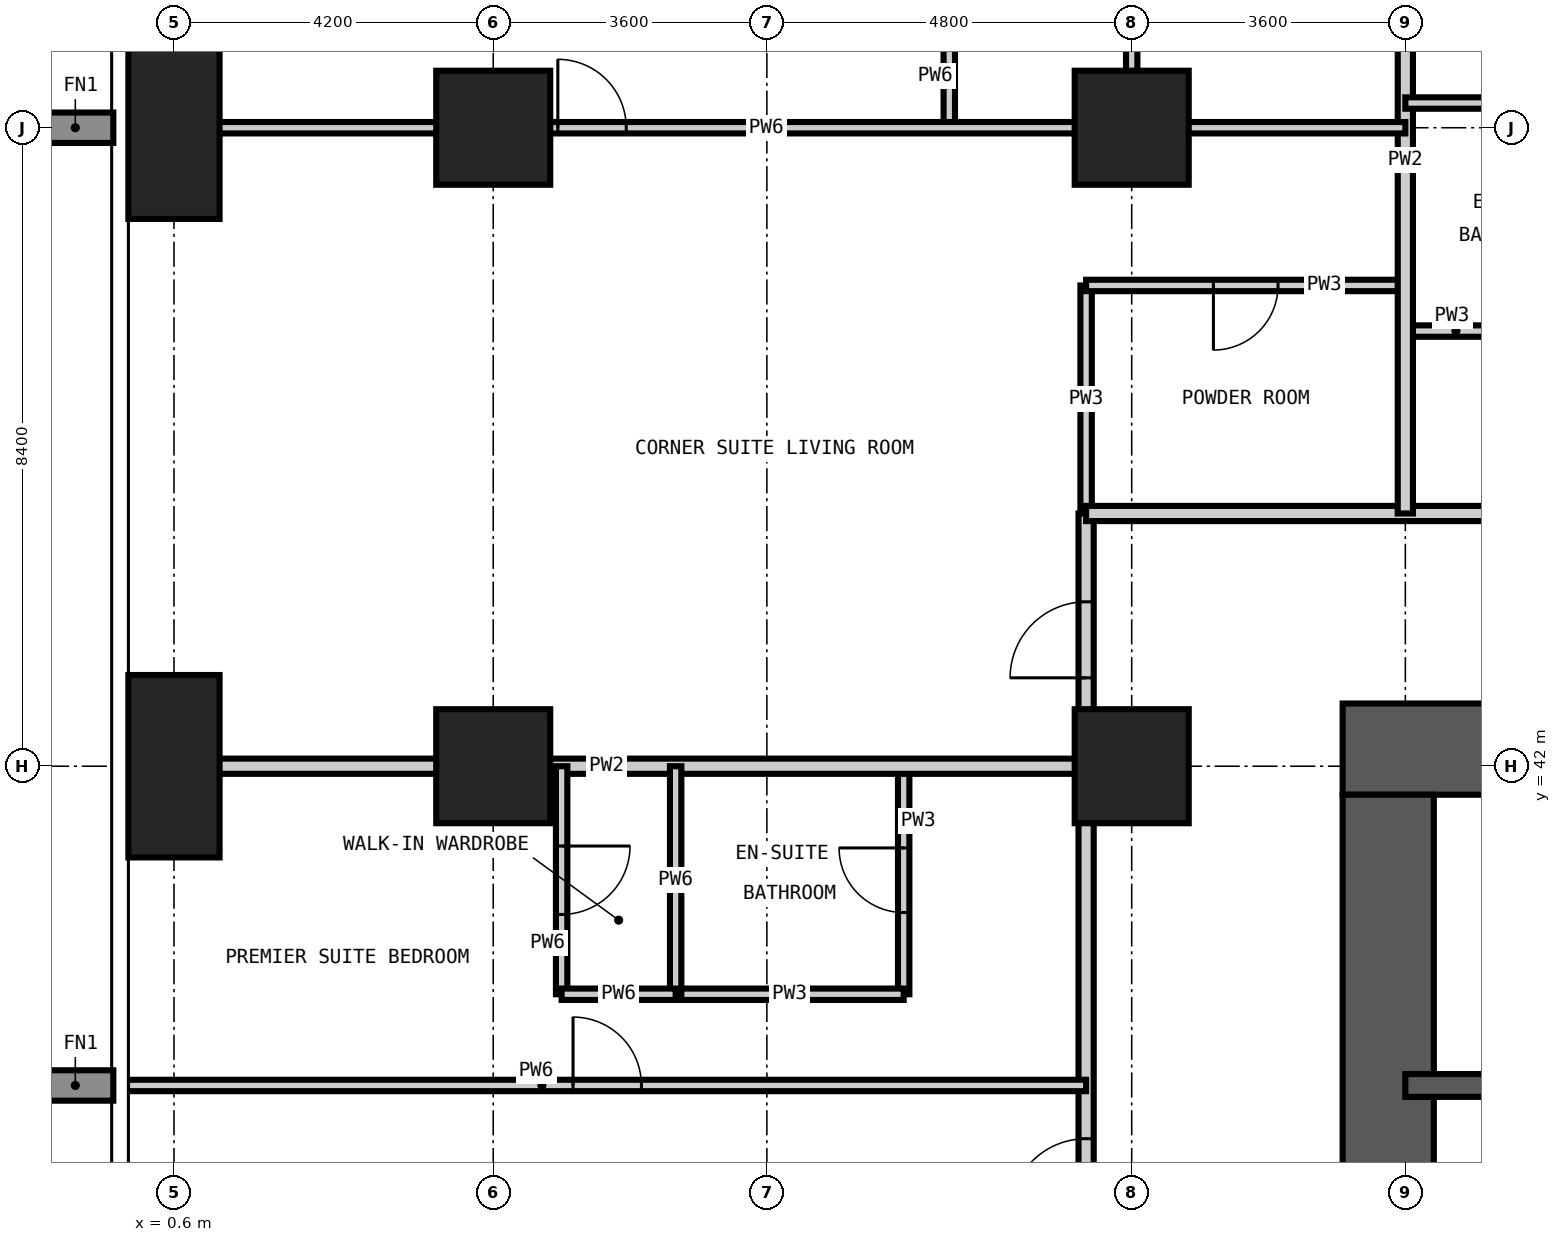
"""IFC4 building model, lengths in metres.
Left out: names, types, materials, properties, quantities, classifications, styles, units other than length and angle.
Written with IfcOpenShell. Run it as: python <this file> out.ifc"""

import sys

from ifc_helpers import new_model, si_unit, direction, frame, frame_2d, origin, origin_2d, place, context, subcontext, project, spatial, rectangle, extrude, element, fill, save


model = new_model("IFC4")
c1 = context("Model", 3, precision=1e-05, world=origin(), true_north=direction((0.0, 1.0)))
c2 = subcontext(c1, "Body", "Model", "MODEL_VIEW")
j1 = project(units=[si_unit("LENGTHUNIT", "METRE"), si_unit("PLANEANGLEUNIT", "RADIAN")], contexts=[c1])
p1 = place(None, origin())
s1 = spatial("IfcSite", under=j1, at=p1, CompositionType="ELEMENT")
p2 = place(p1, origin())
s2 = spatial("IfcBuilding", under=s1, at=p2, CompositionType="ELEMENT")
p3 = place(p2, frame((0.0, 0.0, 100.8)))
s3 = spatial("IfcBuildingStorey", under=s2, at=p3, CompositionType="ELEMENT", Elevation=100.8)
for number, where, z_axis, x_axis in (
    (1, (0.6, 42.0, -0.35), (0.0, 0.0, 1.0), (1.0, 0.0, 0.0)),
    (2, (0.6, 50.4, -0.35), (0.0, 0.0, 1.0), (1.0, 0.0, 0.0)),
):
    element("IfcColumn", number, at=place(p3, frame(where, z_axis=z_axis, x_axis=x_axis)), inside=s3, PredefinedType="COLUMN", context=c2, shape_type="SweptSolid", body=[
        extrude(rectangle(XDim=1.2, YDim=2.4, at=origin_2d()), origin(), (0.0, 0.0, 1.0), 3.6),
    ])
for number, where, z_axis, x_axis in (
    (3, (4.8, 42.0, -0.35), (0.0, 0.0, 1.0), (1.0, 0.0, 0.0)),
    (4, (4.8, 50.4, -0.35), (0.0, 0.0, 1.0), (1.0, 0.0, 0.0)),
    (5, (13.2, 42.0, -0.35), (0.0, 0.0, 1.0), (1.0, 0.0, 0.0)),
    (6, (13.2, 50.4, -0.35), (0.0, 0.0, 1.0), (1.0, 0.0, 0.0)),
):
    element("IfcColumn", number, at=place(p3, frame(where, z_axis=z_axis, x_axis=x_axis)), inside=s3, PredefinedType="COLUMN", context=c2, shape_type="SweptSolid", body=[
        extrude(rectangle(XDim=1.5, YDim=1.5, at=origin_2d()), origin(), (0.0, 0.0, 1.0), 3.6),
    ])
p4 = place(p3, frame((42.825, 42.225, -0.35), z_axis=(0.0, 0.0, 1.0), x_axis=(-1.0, 0.0, 0.0)))
e7 = element("IfcWall", 7, at=p4, inside=s3, PredefinedType="SHEAR", context=c2, shape_type="SweptSolid", body=[
    extrude(rectangle(XDim=26.85, YDim=1.2, at=frame_2d((13.425, 0.0))), origin(), (0.0, 0.0, 1.0), 3.6),
])
p5 = place(p4, frame((21.325, 0.0, 0.35)))
e8 = element("IfcOpeningElement", 8, at=p5, cuts=e7, PredefinedType="OPENING", context=c2, shape_type="SweptSolid", body=[
    extrude(rectangle(XDim=1.0, YDim=2.1, at=frame_2d((0.5, 1.05))), frame((0.0, 0.61, 0.0), z_axis=(0.0, -1.0, 0.0), x_axis=(1.0, 0.0, 0.0)), (0.0, 0.0, 1.0), 1.22),
])
p6 = place(p4, frame((10.725, 0.0, 0.35)))
e9 = element("IfcOpeningElement", 9, at=p6, cuts=e7, PredefinedType="OPENING", context=c2, shape_type="SweptSolid", body=[
    extrude(rectangle(XDim=1.2, YDim=2.2, at=frame_2d((0.6, 1.1))), frame((0.0, 0.61, 0.0), z_axis=(0.0, -1.0, 0.0), x_axis=(1.0, 0.0, 0.0)), (0.0, 0.0, 1.0), 1.22),
])
p7 = place(p3, frame((16.575, 41.625, -0.35), z_axis=(0.0, 0.0, 1.0), x_axis=(0.0, -1.0, 0.0)))
e10 = element("IfcWall", 10, at=p7, inside=s3, PredefinedType="SHEAR", context=c2, shape_type="SweptSolid", body=[
    extrude(rectangle(XDim=24.45, YDim=1.2, at=frame_2d((12.225, 0.0))), origin(), (0.0, 0.0, 1.0), 3.6),
])
p8 = place(p7, frame((11.325, 0.0, 0.35)))
e11 = element("IfcOpeningElement", 11, at=p8, cuts=e10, PredefinedType="OPENING", context=c2, shape_type="SweptSolid", body=[
    extrude(rectangle(XDim=1.8, YDim=2.2, at=frame_2d((0.9, 1.1))), frame((0.0, 0.61, 0.0), z_axis=(0.0, -1.0, 0.0), x_axis=(1.0, 0.0, 0.0)), (0.0, 0.0, 1.0), 1.22),
])
p9 = place(p7, frame((20.125, 0.0, 0.35)))
e12 = element("IfcOpeningElement", 12, at=p9, cuts=e10, PredefinedType="OPENING", context=c2, shape_type="SweptSolid", body=[
    extrude(rectangle(XDim=1.0, YDim=2.1, at=frame_2d((0.5, 1.05))), frame((0.0, 0.61, 0.0), z_axis=(0.0, -1.0, 0.0), x_axis=(1.0, 0.0, 0.0)), (0.0, 0.0, 1.0), 1.22),
])
p10 = place(p7, frame((5.425, 0.0, 0.35)))
e13 = element("IfcOpeningElement", 13, at=p10, cuts=e10, PredefinedType="OPENING", context=c2, shape_type="SweptSolid", body=[
    extrude(rectangle(XDim=1.0, YDim=2.1, at=frame_2d((0.5, 1.05))), frame((0.0, 0.61, 0.0), z_axis=(0.0, -1.0, 0.0), x_axis=(1.0, 0.0, 0.0)), (0.0, 0.0, 1.0), 1.22),
])
p11 = place(p3, frame((16.8, 37.8, -0.35), z_axis=(0.0, 0.0, 1.0), x_axis=(1.0, 0.0, 0.0)))
e14 = element("IfcWall", 14, at=p11, inside=s3, PredefinedType="SHEAR", context=c2, shape_type="SweptSolid", body=[
    extrude(rectangle(XDim=8.4, YDim=0.3, at=frame_2d((4.2, 0.0))), origin(), (0.0, 0.0, 1.0), 3.6),
])
p12 = place(p3, frame((10.2, 39.0, 0.0), z_axis=(0.0, 0.0, 1.0), x_axis=(0.0, 1.0, 0.0)))
e15 = element("IfcWall", 15, at=p12, inside=s3, PredefinedType="PARTITIONING", context=c2, shape_type="SweptSolid", body=[
    extrude(rectangle(XDim=3.0, YDim=0.15, at=frame_2d((1.5, 0.0))), origin(), (0.0, 0.0, 1.0), 3.25),
])
p13 = place(p12, frame((1.075, 0.0, 0.0)))
e16 = element("IfcOpeningElement", 16, at=p13, cuts=e15, PredefinedType="OPENING", context=c2, shape_type="SweptSolid", body=[
    extrude(rectangle(XDim=0.85, YDim=2.1, at=frame_2d((0.425, 1.05))), frame((0.0, 0.085, 0.0), z_axis=(0.0, -1.0, 0.0), x_axis=(1.0, 0.0, 0.0)), (0.0, 0.0, 1.0), 0.17),
])
for number, where, z_axis, x_axis in (
    (17, (12.6, 45.325, 0.0), (0.0, 0.0, 1.0), (0.0, 1.0, 0.0)),
    (18, (7.2, 39.0, 0.0), (0.0, 0.0, 1.0), (1.0, 0.0, 0.0)),
):
    element("IfcWall", number, at=place(p3, frame(where, z_axis=z_axis, x_axis=x_axis)), inside=s3, PredefinedType="PARTITIONING", context=c2, shape_type="SweptSolid", body=[
        extrude(rectangle(XDim=3.0, YDim=0.15, at=frame_2d((1.5, 0.0))), origin(), (0.0, 0.0, 1.0), 3.25),
    ])
p14 = place(p3, frame((16.8, 47.725, 0.0), z_axis=(0.0, 0.0, 1.0), x_axis=(1.0, 0.0, 0.0)))
e19 = element("IfcWall", 19, at=p14, inside=s3, PredefinedType="PARTITIONING", context=c2, shape_type="SweptSolid", body=[
    extrude(rectangle(XDim=3.0, YDim=0.15, at=frame_2d((1.5, 0.0))), origin(), (0.0, 0.0, 1.0), 3.25),
])
p15 = place(p14, frame((1.075, 0.0, 0.0)))
e20 = element("IfcOpeningElement", 20, at=p15, cuts=e19, PredefinedType="OPENING", context=c2, shape_type="SweptSolid", body=[
    extrude(rectangle(XDim=0.85, YDim=2.1, at=frame_2d((0.425, 1.05))), frame((0.0, 0.085, 0.0), z_axis=(0.0, -1.0, 0.0), x_axis=(1.0, 0.0, 0.0)), (0.0, 0.0, 1.0), 0.17),
])
p16 = place(p3, frame((12.6, 48.325, 0.0), z_axis=(0.0, 0.0, 1.0), x_axis=(1.0, 0.0, 0.0)))
e21 = element("IfcWall", 21, at=p16, inside=s3, PredefinedType="PARTITIONING", context=c2, shape_type="SweptSolid", body=[
    extrude(rectangle(XDim=4.2, YDim=0.15, at=frame_2d((2.1, 0.0))), origin(), (0.0, 0.0, 1.0), 3.25),
])
p17 = place(p16, frame((1.675, 0.0, 0.0)))
e22 = element("IfcOpeningElement", 22, at=p17, cuts=e21, PredefinedType="OPENING", context=c2, shape_type="SweptSolid", body=[
    extrude(rectangle(XDim=0.85, YDim=2.1, at=frame_2d((0.425, 1.05))), frame((0.0, 0.085, 0.0), z_axis=(0.0, -1.0, 0.0), x_axis=(1.0, 0.0, 0.0)), (0.0, 0.0, 1.0), 0.17),
])
p18 = place(p3, frame((12.6, 14.075, 0.0), z_axis=(0.0, 0.0, 1.0), x_axis=(0.0, 1.0, 0.0)))
e23 = element("IfcWall", 23, at=p18, inside=s3, PredefinedType="PARTITIONING", context=c2, shape_type="SweptSolid", body=[
    extrude(rectangle(XDim=31.25, YDim=0.2, at=frame_2d((15.625, 0.0))), origin(), (0.0, 0.0, 1.0), 3.25),
])
p19 = place(p18, frame((5.225, 0.0, 0.0)))
e24 = element("IfcOpeningElement", 24, at=p19, cuts=e23, PredefinedType="OPENING", context=c2, shape_type="SweptSolid", body=[
    extrude(rectangle(XDim=1.0, YDim=2.2, at=frame_2d((0.5, 1.1))), frame((0.0, 0.11, 0.0), z_axis=(0.0, -1.0, 0.0), x_axis=(1.0, 0.0, 0.0)), (0.0, 0.0, 1.0), 0.22),
])
p20 = place(p18, frame((13.625, 0.0, 0.0)))
e25 = element("IfcOpeningElement", 25, at=p20, cuts=e23, PredefinedType="OPENING", context=c2, shape_type="SweptSolid", body=[
    extrude(rectangle(XDim=1.0, YDim=2.2, at=frame_2d((0.5, 1.1))), frame((0.0, 0.11, 0.0), z_axis=(0.0, -1.0, 0.0), x_axis=(1.0, 0.0, 0.0)), (0.0, 0.0, 1.0), 0.22),
])
p21 = place(p18, frame((22.025, 0.0, 0.0)))
e26 = element("IfcOpeningElement", 26, at=p21, cuts=e23, PredefinedType="OPENING", context=c2, shape_type="SweptSolid", body=[
    extrude(rectangle(XDim=1.0, YDim=2.2, at=frame_2d((0.5, 1.1))), frame((0.0, 0.11, 0.0), z_axis=(0.0, -1.0, 0.0), x_axis=(1.0, 0.0, 0.0)), (0.0, 0.0, 1.0), 0.22),
])
p22 = place(p18, frame((0.863, 0.0, 0.0)))
e27 = element("IfcOpeningElement", 27, at=p22, cuts=e23, PredefinedType="OPENING", context=c2, shape_type="SweptSolid", body=[
    extrude(rectangle(XDim=1.0, YDim=2.2, at=frame_2d((0.5, 1.1))), frame((0.0, 0.11, 0.0), z_axis=(0.0, -1.0, 0.0), x_axis=(1.0, 0.0, 0.0)), (0.0, 0.0, 1.0), 0.22),
])
p23 = place(p18, frame((29.088, 0.0, 0.0)))
e28 = element("IfcOpeningElement", 28, at=p23, cuts=e23, PredefinedType="OPENING", context=c2, shape_type="SweptSolid", body=[
    extrude(rectangle(XDim=1.0, YDim=2.2, at=frame_2d((0.5, 1.1))), frame((0.0, 0.11, 0.0), z_axis=(0.0, -1.0, 0.0), x_axis=(1.0, 0.0, 0.0)), (0.0, 0.0, 1.0), 0.22),
])
p24 = place(p3, frame((12.6, 45.325, 0.0), z_axis=(0.0, 0.0, 1.0), x_axis=(1.0, 0.0, 0.0)))
e29 = element("IfcWall", 29, at=p24, inside=s3, PredefinedType="PARTITIONING", context=c2, shape_type="SweptSolid", body=[
    extrude(rectangle(XDim=33.325, YDim=0.2, at=frame_2d((16.663, 0.0))), origin(), (0.0, 0.0, 1.0), 3.25),
])
p25 = place(p24, frame((7.9, 0.0, 0.0)))
e30 = element("IfcOpeningElement", 30, at=p25, cuts=e29, PredefinedType="OPENING", context=c2, shape_type="SweptSolid", body=[
    extrude(rectangle(XDim=1.0, YDim=2.2, at=frame_2d((0.5, 1.1))), frame((0.0, 0.11, 0.0), z_axis=(0.0, -1.0, 0.0), x_axis=(1.0, 0.0, 0.0)), (0.0, 0.0, 1.0), 0.22),
])
p26 = place(p24, frame((16.3, 0.0, 0.0)))
e31 = element("IfcOpeningElement", 31, at=p26, cuts=e29, PredefinedType="OPENING", context=c2, shape_type="SweptSolid", body=[
    extrude(rectangle(XDim=1.0, YDim=2.2, at=frame_2d((0.5, 1.1))), frame((0.0, 0.11, 0.0), z_axis=(0.0, -1.0, 0.0), x_axis=(1.0, 0.0, 0.0)), (0.0, 0.0, 1.0), 0.22),
])
p27 = place(p24, frame((24.7, 0.0, 0.0)))
e32 = element("IfcOpeningElement", 32, at=p27, cuts=e29, PredefinedType="OPENING", context=c2, shape_type="SweptSolid", body=[
    extrude(rectangle(XDim=1.0, YDim=2.2, at=frame_2d((0.5, 1.1))), frame((0.0, 0.11, 0.0), z_axis=(0.0, -1.0, 0.0), x_axis=(1.0, 0.0, 0.0)), (0.0, 0.0, 1.0), 0.22),
])
p28 = place(p3, frame((16.8, 45.325, 0.0), z_axis=(0.0, 0.0, 1.0), x_axis=(0.0, 1.0, 0.0)))
e33 = element("IfcWall", 33, at=p28, inside=s3, PredefinedType="PARTITIONING", context=c2, shape_type="SweptSolid", body=[
    extrude(rectangle(XDim=9.293, YDim=0.2, at=frame_2d((4.646, 0.0))), origin(), (0.0, 0.0, 1.0), 3.25),
])
p29 = place(p3, frame((-0.018, 42.0, 0.0), z_axis=(0.0, 0.0, 1.0), x_axis=(1.0, 0.0, 0.0)))
e34 = element("IfcWall", 34, at=p29, inside=s3, PredefinedType="PARTITIONING", context=c2, shape_type="SweptSolid", body=[
    extrude(rectangle(XDim=12.618, YDim=0.2, at=frame_2d((6.309, 0.0))), origin(), (0.0, 0.0, 1.0), 3.25),
])
p30 = place(p3, frame((5.7, 39.0, 0.0), z_axis=(0.0, 0.0, 1.0), x_axis=(0.0, 1.0, 0.0)))
e35 = element("IfcWall", 35, at=p30, inside=s3, PredefinedType="PARTITIONING", context=c2, shape_type="SweptSolid", body=[
    extrude(rectangle(XDim=3.0, YDim=0.15, at=frame_2d((1.5, 0.0))), origin(), (0.0, 0.0, 1.0), 3.25),
])
p31 = place(p30, frame((1.05, 0.0, 0.0)))
e36 = element("IfcOpeningElement", 36, at=p31, cuts=e35, PredefinedType="OPENING", context=c2, shape_type="SweptSolid", body=[
    extrude(rectangle(XDim=0.9, YDim=2.1, at=frame_2d((0.45, 1.05))), frame((0.0, 0.085, 0.0), z_axis=(0.0, -1.0, 0.0), x_axis=(1.0, 0.0, 0.0)), (0.0, 0.0, 1.0), 0.17),
])
p32 = place(p3, frame((7.2, 39.0, 0.0), z_axis=(0.0, 0.0, 1.0), x_axis=(0.0, 1.0, 0.0)))
e37 = element("IfcWall", 37, at=p32, inside=s3, PredefinedType="PARTITIONING", context=c2, shape_type="SweptSolid", body=[
    extrude(rectangle(XDim=3.0, YDim=0.15, at=frame_2d((1.5, 0.0))), origin(), (0.0, 0.0, 1.0), 3.25),
])
p33 = place(p3, frame((10.8, 50.4, 0.0), z_axis=(0.0, 0.0, 1.0), x_axis=(0.0, 1.0, 0.0)))
e38 = element("IfcWall", 38, at=p33, inside=s3, PredefinedType="PARTITIONING", context=c2, shape_type="SweptSolid", body=[
    extrude(rectangle(XDim=3.0, YDim=0.15, at=frame_2d((1.5, 0.0))), origin(), (0.0, 0.0, 1.0), 3.25),
])
p34 = place(p33, frame((1.05, 0.0, 0.0)))
e39 = element("IfcOpeningElement", 39, at=p34, cuts=e38, PredefinedType="OPENING", context=c2, shape_type="SweptSolid", body=[
    extrude(rectangle(XDim=0.9, YDim=2.1, at=frame_2d((0.45, 1.05))), frame((0.0, 0.085, 0.0), z_axis=(0.0, -1.0, 0.0), x_axis=(1.0, 0.0, 0.0)), (0.0, 0.0, 1.0), 0.17),
])
p35 = place(p3, frame((13.2, 50.4, 0.0), z_axis=(0.0, 0.0, 1.0), x_axis=(0.0, 1.0, 0.0)))
e40 = element("IfcWall", 40, at=p35, inside=s3, PredefinedType="PARTITIONING", context=c2, shape_type="SweptSolid", body=[
    extrude(rectangle(XDim=3.0, YDim=0.15, at=frame_2d((1.5, 0.0))), origin(), (0.0, 0.0, 1.0), 3.25),
])
p36 = place(p3, frame((-0.018, 37.8, 0.0), z_axis=(0.0, 0.0, 1.0), x_axis=(1.0, 0.0, 0.0)))
e41 = element("IfcWall", 41, at=p36, inside=s3, PredefinedType="PARTITIONING", context=c2, shape_type="SweptSolid", body=[
    extrude(rectangle(XDim=12.618, YDim=0.15, at=frame_2d((6.309, 0.0))), origin(), (0.0, 0.0, 1.0), 3.25),
])
p37 = place(p36, frame((5.868, 0.0, 0.0)))
e42 = element("IfcOpeningElement", 42, at=p37, cuts=e41, PredefinedType="OPENING", context=c2, shape_type="SweptSolid", body=[
    extrude(rectangle(XDim=0.9, YDim=2.1, at=frame_2d((0.45, 1.05))), frame((0.0, 0.085, 0.0), z_axis=(0.0, -1.0, 0.0), x_axis=(1.0, 0.0, 0.0)), (0.0, 0.0, 1.0), 0.17),
])
p38 = place(p3, frame((5.7, 39.0, 0.0), z_axis=(0.0, 0.0, 1.0), x_axis=(1.0, 0.0, 0.0)))
e43 = element("IfcWall", 43, at=p38, inside=s3, PredefinedType="PARTITIONING", context=c2, shape_type="SweptSolid", body=[
    extrude(rectangle(XDim=1.5, YDim=0.15, at=frame_2d((0.75, 0.0))), origin(), (0.0, 0.0, 1.0), 3.25),
])
p39 = place(p3, frame((-0.018, 50.4, 0.0), z_axis=(0.0, 0.0, 1.0), x_axis=(1.0, 0.0, 0.0)))
e44 = element("IfcWall", 44, at=p39, inside=s3, PredefinedType="PARTITIONING", context=c2, shape_type="SweptSolid", body=[
    extrude(rectangle(XDim=16.818, YDim=0.15, at=frame_2d((8.409, 0.0))), origin(), (0.0, 0.0, 1.0), 3.25),
])
p40 = place(p39, frame((5.668, 0.0, 0.0)))
e45 = element("IfcOpeningElement", 45, at=p40, cuts=e44, PredefinedType="OPENING", context=c2, shape_type="SweptSolid", body=[
    extrude(rectangle(XDim=0.9, YDim=2.1, at=frame_2d((0.45, 1.05))), frame((0.0, 0.085, 0.0), z_axis=(0.0, -1.0, 0.0), x_axis=(1.0, 0.0, 0.0)), (0.0, 0.0, 1.0), 0.17),
])
p41 = place(p3, frame((16.8, 50.725, 0.0), z_axis=(0.0, 0.0, 1.0), x_axis=(1.0, 0.0, 0.0)))
e46 = element("IfcWall", 46, at=p41, inside=s3, PredefinedType="PARTITIONING", context=c2, shape_type="SweptSolid", body=[
    extrude(rectangle(XDim=3.0, YDim=0.15, at=frame_2d((1.5, 0.0))), origin(), (0.0, 0.0, 1.0), 3.25),
])
p42 = place(p21, origin())
e47 = element("IfcDoor", 47, at=p42, inside=s3, OperationType="SINGLE_SWING_LEFT", PredefinedType="DOOR", context=c2, shape_type="SweptSolid", body=[
    extrude(rectangle(XDim=1.0, YDim=2.2, at=frame_2d((0.5, 1.1))), frame((0.0, 0.025, 0.0), z_axis=(0.0, -1.0, 0.0), x_axis=(1.0, 0.0, 0.0)), (0.0, 0.0, 1.0), 0.05),
])
fill(e26, e47)
p43 = place(p37, origin())
e48 = element("IfcDoor", 48, at=p43, inside=s3, OperationType="SINGLE_SWING_LEFT", PredefinedType="DOOR", context=c2, shape_type="SweptSolid", body=[
    extrude(rectangle(XDim=0.9, YDim=2.1, at=frame_2d((0.45, 1.05))), frame((0.0, 0.025, 0.0), z_axis=(0.0, -1.0, 0.0), x_axis=(1.0, 0.0, 0.0)), (0.0, 0.0, 1.0), 0.05),
])
fill(e42, e48)
p44 = place(p13, origin())
e49 = element("IfcDoor", 49, at=p44, inside=s3, OperationType="SINGLE_SWING_RIGHT", PredefinedType="DOOR", context=c2, shape_type="SweptSolid", body=[
    extrude(rectangle(XDim=0.85, YDim=2.1, at=frame_2d((0.425, 1.05))), frame((0.0, 0.025, 0.0), z_axis=(0.0, -1.0, 0.0), x_axis=(1.0, 0.0, 0.0)), (0.0, 0.0, 1.0), 0.05),
])
fill(e16, e49)
p45 = place(p31, frame((0.9, 0.0, 0.0), z_axis=(0.0, 0.0, 1.0), x_axis=(-1.0, 0.0, 0.0)))
e50 = element("IfcDoor", 50, at=p45, inside=s3, OperationType="SINGLE_SWING_LEFT", PredefinedType="DOOR", context=c2, shape_type="SweptSolid", body=[
    extrude(rectangle(XDim=0.9, YDim=2.1, at=frame_2d((0.45, 1.05))), frame((0.0, 0.025, 0.0), z_axis=(0.0, -1.0, 0.0), x_axis=(1.0, 0.0, 0.0)), (0.0, 0.0, 1.0), 0.05),
])
fill(e36, e50)
p46 = place(p23, origin())
e51 = element("IfcDoor", 51, at=p46, inside=s3, OperationType="SINGLE_SWING_LEFT", PredefinedType="DOOR", context=c2, shape_type="SweptSolid", body=[
    extrude(rectangle(XDim=1.0, YDim=2.2, at=frame_2d((0.5, 1.1))), frame((0.0, 0.025, 0.0), z_axis=(0.0, -1.0, 0.0), x_axis=(1.0, 0.0, 0.0)), (0.0, 0.0, 1.0), 0.05),
])
fill(e28, e51)
p47 = place(p17, frame((0.85, 0.0, 0.0), z_axis=(0.0, 0.0, 1.0), x_axis=(-1.0, 0.0, 0.0)))
e52 = element("IfcDoor", 52, at=p47, inside=s3, OperationType="SINGLE_SWING_RIGHT", PredefinedType="DOOR", context=c2, shape_type="SweptSolid", body=[
    extrude(rectangle(XDim=0.85, YDim=2.1, at=frame_2d((0.425, 1.05))), frame((0.0, 0.025, 0.0), z_axis=(0.0, -1.0, 0.0), x_axis=(1.0, 0.0, 0.0)), (0.0, 0.0, 1.0), 0.05),
])
fill(e22, e52)
p48 = place(p40, origin())
e53 = element("IfcDoor", 53, at=p48, inside=s3, OperationType="SINGLE_SWING_LEFT", PredefinedType="DOOR", context=c2, shape_type="SweptSolid", body=[
    extrude(rectangle(XDim=0.9, YDim=2.1, at=frame_2d((0.45, 1.05))), frame((0.0, 0.025, 0.0), z_axis=(0.0, -1.0, 0.0), x_axis=(1.0, 0.0, 0.0)), (0.0, 0.0, 1.0), 0.05),
])
fill(e45, e53)
save(model, sys.argv[1])
